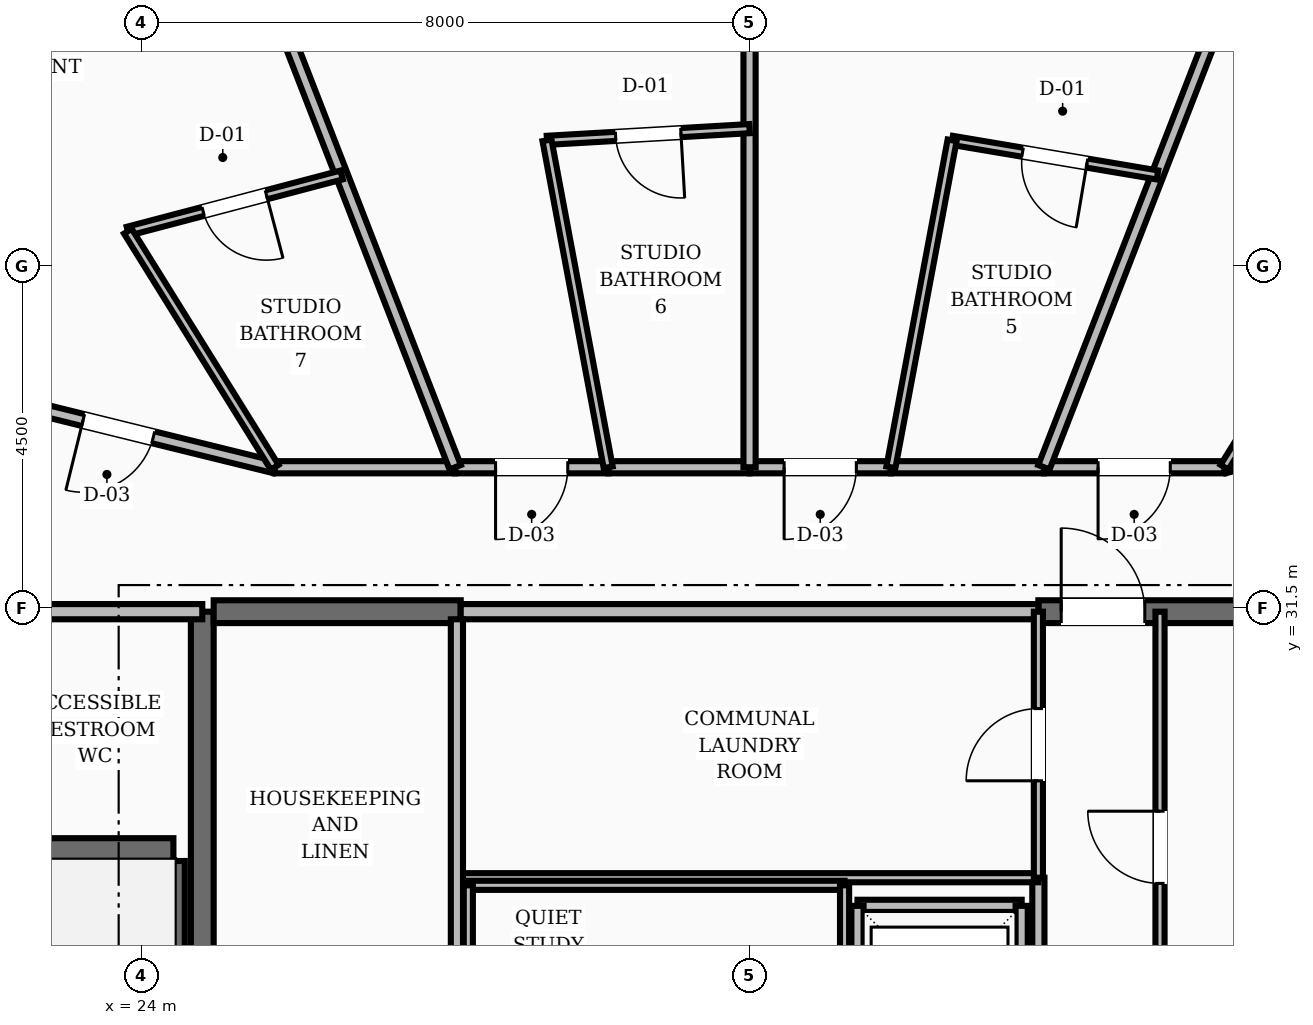
"""IFC4 building model, lengths in metres.
Left out: names, types, materials, properties, quantities, classifications, styles, units other than length and angle.
Written with IfcOpenShell. Run it as: python <this file> out.ifc"""

import sys

from ifc_helpers import new_model, si_unit, direction, frame, frame_2d, origin, place, context, subcontext, project, spatial, rectangle, extrude, element, fill, save


model = new_model("IFC4")
c1 = context("Model", 3, precision=1e-05, world=origin(), true_north=direction((0.0, 1.0)))
c2 = subcontext(c1, "Body", "Model", "MODEL_VIEW")
j1 = project(units=[si_unit("LENGTHUNIT", "METRE"), si_unit("PLANEANGLEUNIT", "RADIAN")], contexts=[c1])
p1 = place(None, origin())
s1 = spatial("IfcSite", under=j1, at=p1, CompositionType="ELEMENT")
p2 = place(p1, origin())
s2 = spatial("IfcBuilding", under=s1, at=p2, CompositionType="ELEMENT")
p3 = place(p2, frame((0.0, 0.0, 258.0)))
s3 = spatial("IfcBuildingStorey", under=s2, at=p3, CompositionType="ELEMENT", Elevation=258.0)
p4 = place(p3, frame((24.8, 25.15, 0.0), z_axis=(0.0, 0.0, 1.0), x_axis=(0.0, 1.0, 0.0)))
e1 = element("IfcWall", 1, at=p4, inside=s3, PredefinedType="SHEAR", context=c2, shape_type="SweptSolid", body=[
    extrude(rectangle(XDim=6.3, YDim=0.3, at=frame_2d((3.15, 0.0))), origin(), (0.0, 0.0, 1.0), 3.6),
])
p5 = place(p3, frame((24.95, 31.45, 0.0), z_axis=(0.0, 0.0, 1.0), x_axis=(1.0, 0.0, 0.0)))
e2 = element("IfcWall", 2, at=p5, inside=s3, PredefinedType="SHEAR", context=c2, shape_type="SweptSolid", body=[
    extrude(rectangle(XDim=3.25, YDim=0.3, at=frame_2d((1.625, 0.0))), origin(), (0.0, 0.0, 1.0), 3.6),
])
p6 = place(p3, frame((35.8, 31.45, 0.0), z_axis=(0.0, 0.0, 1.0), x_axis=(1.0, 0.0, 0.0)))
e3 = element("IfcWall", 3, at=p6, inside=s3, PredefinedType="SHEAR", context=c2, shape_type="SweptSolid", body=[
    extrude(rectangle(XDim=3.25, YDim=0.3, at=frame_2d((1.625, 0.0))), origin(), (0.0, 0.0, 1.0), 3.6),
])
p7 = place(p6, frame((0.3, 0.0, 0.0)))
e4 = element("IfcOpeningElement", 4, at=p7, cuts=e3, PredefinedType="OPENING", context=c2, shape_type="SweptSolid", body=[
    extrude(rectangle(XDim=1.1, YDim=2.1, at=frame_2d((0.55, 1.05))), frame((0.0, 0.16, 0.0), z_axis=(0.0, -1.0, 0.0), x_axis=(1.0, 0.0, 0.0)), (0.0, 0.0, 1.0), 0.32),
])
p8 = place(p3, frame((24.42, 19.43, 0.0), z_axis=(0.0, 0.0, 1.0), x_axis=(0.0, 1.0, 0.0)))
e5 = element("IfcWall", 5, at=p8, inside=s3, PredefinedType="SHEAR", context=c2, shape_type="SweptSolid", body=[
    extrude(rectangle(XDim=8.74, YDim=0.3, at=frame_2d((4.37, 0.0))), origin(), (0.0, 0.0, 1.0), 3.6),
])
p9 = place(p3, frame((20.82, 28.32, 0.0), z_axis=(0.0, 0.0, 1.0), x_axis=(1.0, 0.0, 0.0)))
e6 = element("IfcWall", 6, at=p9, inside=s3, PredefinedType="SHEAR", context=c2, shape_type="SweptSolid", body=[
    extrude(rectangle(XDim=3.6, YDim=0.3, at=frame_2d((1.8, 0.0))), origin(), (0.0, 0.0, 1.0), 3.6),
])
p10 = place(p3, frame((20.82, 31.45, 0.0), z_axis=(0.0, 0.0, 1.0), x_axis=(1.0, 0.0, 0.0)))
e7 = element("IfcWall", 7, at=p10, inside=s3, PredefinedType="SOLIDWALL", context=c2, shape_type="SweptSolid", body=[
    extrude(rectangle(XDim=3.98, YDim=0.2, at=frame_2d((1.99, 0.0))), origin(), (0.0, 0.0, 1.0), 2.87),
])
p11 = place(p3, frame((35.8, 25.25, 0.0), z_axis=(0.0, 0.0, 1.0), x_axis=(0.0, 1.0, 0.0)))
e8 = element("IfcWall", 8, at=p11, inside=s3, PredefinedType="SOLIDWALL", context=c2, shape_type="SweptSolid", body=[
    extrude(rectangle(XDim=2.7, YDim=0.16, at=frame_2d((1.35, 0.0))), origin(), (0.0, 0.0, 1.0), 2.87),
])
for number, where, z_axis, x_axis in (
    (9, (33.42, 27.58, 0.0), (0.0, 0.0, 1.0), (1.0, 0.0, 0.0)),
    (10, (33.42, 25.42, 0.0), (0.0, 0.0, 1.0), (0.0, 1.0, 0.0)),
    (11, (35.58, 25.42, 0.0), (0.0, 0.0, 1.0), (0.0, 1.0, 0.0)),
):
    element("IfcWall", number, at=place(p3, frame(where, z_axis=z_axis, x_axis=x_axis)), inside=s3, PredefinedType="SOLIDWALL", context=c2, shape_type="SweptSolid", body=[
        extrude(rectangle(XDim=2.16, YDim=0.16, at=frame_2d((1.08, 0.0))), origin(), (0.0, 0.0, 1.0), 2.87),
    ])
p12 = place(p3, frame((28.2, 31.45, 0.0), z_axis=(0.0, 0.0, 1.0), x_axis=(1.0, 0.0, 0.0)))
e12 = element("IfcWall", 12, at=p12, inside=s3, PredefinedType="SOLIDWALL", context=c2, shape_type="SweptSolid", body=[
    extrude(rectangle(XDim=7.6, YDim=0.2, at=frame_2d((3.8, 0.0))), origin(), (0.0, 0.0, 1.0), 2.87),
])
p13 = place(p3, frame((28.2, 27.95, 0.0), z_axis=(0.0, 0.0, 1.0), x_axis=(1.0, 0.0, 0.0)))
e13 = element("IfcWall", 13, at=p13, inside=s3, PredefinedType="PARTITIONING", context=c2, shape_type="SweptSolid", body=[
    extrude(rectangle(XDim=7.6, YDim=0.12, at=frame_2d((3.8, 0.0))), origin(), (0.0, 0.0, 1.0), 2.87),
])
p14 = place(p3, frame((35.8, 27.95, 0.0), z_axis=(0.0, 0.0, 1.0), x_axis=(0.0, 1.0, 0.0)))
e14 = element("IfcWall", 14, at=p14, inside=s3, PredefinedType="PARTITIONING", context=c2, shape_type="SweptSolid", body=[
    extrude(rectangle(XDim=3.5, YDim=0.12, at=frame_2d((1.75, 0.0))), origin(), (0.0, 0.0, 1.0), 2.87),
])
p15 = place(p14, frame((1.275, 0.0, 0.0)))
e15 = element("IfcOpeningElement", 15, at=p15, cuts=e14, PredefinedType="OPENING", context=c2, shape_type="SweptSolid", body=[
    extrude(rectangle(XDim=0.95, YDim=2.1, at=frame_2d((0.475, 1.05))), frame((0.0, 0.07, 0.0), z_axis=(0.0, -1.0, 0.0), x_axis=(1.0, 0.0, 0.0)), (0.0, 0.0, 1.0), 0.14),
])
p16 = place(p3, frame((28.3, 27.85, 0.0), z_axis=(0.0, 0.0, 1.0), x_axis=(1.0, 0.0, 0.0)))
e16 = element("IfcWall", 16, at=p16, inside=s3, PredefinedType="PARTITIONING", context=c2, shape_type="SweptSolid", body=[
    extrude(rectangle(XDim=4.95, YDim=0.12, at=frame_2d((2.475, 0.0))), origin(), (0.0, 0.0, 1.0), 2.87),
])
for number, where, z_axis, x_axis in (
    (17, (28.3, 25.35, 0.0), (0.0, 0.0, 1.0), (0.0, 1.0, 0.0)),
    (18, (33.25, 25.35, 0.0), (0.0, 0.0, 1.0), (0.0, 1.0, 0.0)),
):
    element("IfcWall", number, at=place(p3, frame(where, z_axis=z_axis, x_axis=x_axis)), inside=s3, PredefinedType="PARTITIONING", context=c2, shape_type="SweptSolid", body=[
        extrude(rectangle(XDim=2.5, YDim=0.12, at=frame_2d((1.25, 0.0))), origin(), (0.0, 0.0, 1.0), 2.87),
    ])
p17 = place(p3, frame((28.15, 25.25, 0.0), z_axis=(0.0, 0.0, 1.0), x_axis=(0.0, 1.0, 0.0)))
e19 = element("IfcWall", 19, at=p17, inside=s3, PredefinedType="SOLIDWALL", context=c2, shape_type="SweptSolid", body=[
    extrude(rectangle(XDim=6.1, YDim=0.16, at=frame_2d((3.05, 0.0))), origin(), (0.0, 0.0, 1.0), 2.87),
])
p18 = place(p3, frame((37.4, 25.25, 0.0), z_axis=(0.0, 0.0, 1.0), x_axis=(0.0, 1.0, 0.0)))
e20 = element("IfcWall", 20, at=p18, inside=s3, PredefinedType="PARTITIONING", context=c2, shape_type="SweptSolid", body=[
    extrude(rectangle(XDim=6.2, YDim=0.12, at=frame_2d((3.1, 0.0))), origin(), (0.0, 0.0, 1.0), 2.87),
])
p19 = place(p18, frame((2.625, 0.0, 0.0)))
e21 = element("IfcOpeningElement", 21, at=p19, cuts=e20, PredefinedType="OPENING", context=c2, shape_type="SweptSolid", body=[
    extrude(rectangle(XDim=0.95, YDim=2.1, at=frame_2d((0.475, 1.05))), frame((0.0, 0.07, 0.0), z_axis=(0.0, -1.0, 0.0), x_axis=(1.0, 0.0, 0.0)), (0.0, 0.0, 1.0), 0.14),
])
p20 = place(p3, frame((42.365, 34.365, 0.0), z_axis=(0.0, 0.0, 1.0), x_axis=(-0.970939799552, -0.239323850978, 0.0)))
e22 = element("IfcWall", 22, at=p20, inside=s3, PredefinedType="SOLIDWALL", context=c2, shape_type="SweptSolid", body=[
    extrude(rectangle(XDim=4.241, YDim=0.16, at=frame_2d((2.12, 0.0))), origin(), (0.0, 0.0, 1.0), 2.87),
])
p21 = place(p3, frame((38.248, 33.35, 0.0), z_axis=(0.0, 0.0, 1.0), x_axis=(-1.0, 0.0, 0.0)))
e23 = element("IfcWall", 23, at=p21, inside=s3, PredefinedType="SOLIDWALL", context=c2, shape_type="SweptSolid", body=[
    extrude(rectangle(XDim=2.375, YDim=0.16, at=frame_2d((1.188, 0.0))), origin(), (0.0, 0.0, 1.0), 2.87),
])
p22 = place(p21, frame((0.712, 0.0, 0.0)))
e24 = element("IfcOpeningElement", 24, at=p22, cuts=e23, PredefinedType="OPENING", context=c2, shape_type="SweptSolid", body=[
    extrude(rectangle(XDim=0.95, YDim=2.1, at=frame_2d((0.475, 1.05))), frame((0.0, 0.09, 0.0), z_axis=(0.0, -1.0, 0.0), x_axis=(1.0, 0.0, 0.0)), (0.0, 0.0, 1.0), 0.18),
])
p23 = place(p3, frame((35.873, 33.35, 0.0), z_axis=(0.0, 0.0, 1.0), x_axis=(-1.0, 0.0, 0.0)))
e25 = element("IfcWall", 25, at=p23, inside=s3, PredefinedType="SOLIDWALL", context=c2, shape_type="SweptSolid", body=[
    extrude(rectangle(XDim=2.013, YDim=0.16, at=frame_2d((1.006, 0.0))), origin(), (0.0, 0.0, 1.0), 2.87),
])
p24 = place(p3, frame((33.86, 33.35, 0.0), z_axis=(0.0, 0.0, 1.0), x_axis=(-1.0, 0.0, 0.0)))
e26 = element("IfcWall", 26, at=p24, inside=s3, PredefinedType="SOLIDWALL", context=c2, shape_type="SweptSolid", body=[
    extrude(rectangle(XDim=1.86, YDim=0.16, at=frame_2d((0.93, 0.0))), origin(), (0.0, 0.0, 1.0), 2.87),
])
p25 = place(p24, frame((0.455, 0.0, 0.0)))
e27 = element("IfcOpeningElement", 27, at=p25, cuts=e26, PredefinedType="OPENING", context=c2, shape_type="SweptSolid", body=[
    extrude(rectangle(XDim=0.95, YDim=2.1, at=frame_2d((0.475, 1.05))), frame((0.0, 0.09, 0.0), z_axis=(0.0, -1.0, 0.0), x_axis=(1.0, 0.0, 0.0)), (0.0, 0.0, 1.0), 0.18),
])
p26 = place(p3, frame((32.0, 33.35, 0.0), z_axis=(0.0, 0.0, 1.0), x_axis=(-1.0, 0.0, 0.0)))
e28 = element("IfcWall", 28, at=p26, inside=s3, PredefinedType="SOLIDWALL", context=c2, shape_type="SweptSolid", body=[
    extrude(rectangle(XDim=1.86, YDim=0.16, at=frame_2d((0.93, 0.0))), origin(), (0.0, 0.0, 1.0), 2.87),
])
p27 = place(p3, frame((30.14, 33.35, 0.0), z_axis=(0.0, 0.0, 1.0), x_axis=(-1.0, 0.0, 0.0)))
e29 = element("IfcWall", 29, at=p27, inside=s3, PredefinedType="SOLIDWALL", context=c2, shape_type="SweptSolid", body=[
    extrude(rectangle(XDim=2.013, YDim=0.16, at=frame_2d((1.006, 0.0))), origin(), (0.0, 0.0, 1.0), 2.87),
])
p28 = place(p27, frame((0.531, 0.0, 0.0)))
e30 = element("IfcOpeningElement", 30, at=p28, cuts=e29, PredefinedType="OPENING", context=c2, shape_type="SweptSolid", body=[
    extrude(rectangle(XDim=0.95, YDim=2.1, at=frame_2d((0.475, 1.05))), frame((0.0, 0.09, 0.0), z_axis=(0.0, -1.0, 0.0), x_axis=(1.0, 0.0, 0.0)), (0.0, 0.0, 1.0), 0.18),
])
p29 = place(p3, frame((28.127, 33.35, 0.0), z_axis=(0.0, 0.0, 1.0), x_axis=(-1.0, 0.0, 0.0)))
e31 = element("IfcWall", 31, at=p29, inside=s3, PredefinedType="SOLIDWALL", context=c2, shape_type="SweptSolid", body=[
    extrude(rectangle(XDim=2.375, YDim=0.16, at=frame_2d((1.188, 0.0))), origin(), (0.0, 0.0, 1.0), 2.87),
])
p30 = place(p3, frame((25.752, 33.35, 0.0), z_axis=(0.0, 0.0, 1.0), x_axis=(-0.970939799552, 0.239323850978, 0.0)))
e32 = element("IfcWall", 32, at=p30, inside=s3, PredefinedType="SOLIDWALL", context=c2, shape_type="SweptSolid", body=[
    extrude(rectangle(XDim=4.241, YDim=0.16, at=frame_2d((2.12, 0.0))), origin(), (0.0, 0.0, 1.0), 2.87),
])
p31 = place(p30, frame((1.646, 0.0, 0.0)))
e33 = element("IfcOpeningElement", 33, at=p31, cuts=e32, PredefinedType="OPENING", context=c2, shape_type="SweptSolid", body=[
    extrude(rectangle(XDim=0.95, YDim=2.1, at=frame_2d((0.475, 1.05))), frame((0.0, 0.09, 0.0), z_axis=(0.0, -1.0, 0.0), x_axis=(1.0, 0.0, 0.0)), (0.0, 0.0, 1.0), 0.18),
])
p32 = place(p3, frame((38.248, 33.35, 0.0), z_axis=(0.0, 0.0, 1.0), x_axis=(0.528107212433, 0.849177703532, 0.0)))
e34 = element("IfcWall", 34, at=p32, inside=s3, PredefinedType="PARTITIONING", context=c2, shape_type="SweptSolid", body=[
    extrude(rectangle(XDim=3.657, YDim=0.12, at=frame_2d((1.828, 0.0))), origin(), (0.0, 0.0, 1.0), 2.87),
])
p33 = place(p3, frame((35.873, 33.35, 0.0), z_axis=(0.0, 0.0, 1.0), x_axis=(0.362124603768, 0.932129696634, 0.0)))
e35 = element("IfcWall", 35, at=p33, inside=s3, PredefinedType="SOLIDWALL", context=c2, shape_type="SweptSolid", body=[
    extrude(rectangle(XDim=10.806, YDim=0.16, at=frame_2d((5.403, 0.0))), origin(), (0.0, 0.0, 1.0), 2.87),
])
p34 = place(p3, frame((37.367, 37.195, 0.0), z_axis=(0.0, 0.0, 1.0), x_axis=(-0.986081513145, 0.166262591807, 0.0)))
e36 = element("IfcWall", 36, at=p34, inside=s3, PredefinedType="PARTITIONING", context=c2, shape_type="SweptSolid", body=[
    extrude(rectangle(XDim=2.74, YDim=0.12, at=frame_2d((1.37, 0.0))), origin(), (0.0, 0.0, 1.0), 2.87),
])
p35 = place(p34, frame((0.94, 0.0, 0.0)))
e37 = element("IfcOpeningElement", 37, at=p35, cuts=e36, PredefinedType="OPENING", context=c2, shape_type="SweptSolid", body=[
    extrude(rectangle(XDim=0.86, YDim=2.1, at=frame_2d((0.43, 1.05))), frame((0.0, 0.07, 0.0), z_axis=(0.0, -1.0, 0.0), x_axis=(1.0, 0.0, 0.0)), (0.0, 0.0, 1.0), 0.14),
])
p36 = place(p3, frame((33.86, 33.35, 0.0), z_axis=(0.0, 0.0, 1.0), x_axis=(0.183965108809, 0.982932774273, 0.0)))
e38 = element("IfcWall", 38, at=p36, inside=s3, PredefinedType="PARTITIONING", context=c2, shape_type="SweptSolid", body=[
    extrude(rectangle(XDim=4.375, YDim=0.12, at=frame_2d((2.188, 0.0))), origin(), (0.0, 0.0, 1.0), 2.87),
])
p37 = place(p3, frame((32.0, 33.35, 0.0), z_axis=(0.0, 0.0, 1.0), x_axis=(0.0, 1.0, 0.0)))
e39 = element("IfcWall", 39, at=p37, inside=s3, PredefinedType="SOLIDWALL", context=c2, shape_type="SweptSolid", body=[
    extrude(rectangle(XDim=11.673, YDim=0.16, at=frame_2d((5.836, 0.0))), origin(), (0.0, 0.0, 1.0), 2.87),
])
p38 = place(p3, frame((32.0, 37.805, 0.0), z_axis=(0.0, 0.0, 1.0), x_axis=(-0.998333158382, -0.057713992024, 0.0)))
e40 = element("IfcWall", 40, at=p38, inside=s3, PredefinedType="PARTITIONING", context=c2, shape_type="SweptSolid", body=[
    extrude(rectangle(XDim=2.669, YDim=0.12, at=frame_2d((1.334, 0.0))), origin(), (0.0, 0.0, 1.0), 2.87),
])
p39 = place(p38, frame((0.905, 0.0, 0.0)))
e41 = element("IfcOpeningElement", 41, at=p39, cuts=e40, PredefinedType="OPENING", context=c2, shape_type="SweptSolid", body=[
    extrude(rectangle(XDim=0.86, YDim=2.1, at=frame_2d((0.43, 1.05))), frame((0.0, 0.07, 0.0), z_axis=(0.0, -1.0, 0.0), x_axis=(1.0, 0.0, 0.0)), (0.0, 0.0, 1.0), 0.14),
])
p40 = place(p3, frame((30.14, 33.35, 0.0), z_axis=(0.0, 0.0, 1.0), x_axis=(-0.183965108809, 0.982932774273, 0.0)))
e42 = element("IfcWall", 42, at=p40, inside=s3, PredefinedType="PARTITIONING", context=c2, shape_type="SweptSolid", body=[
    extrude(rectangle(XDim=4.375, YDim=0.12, at=frame_2d((2.188, 0.0))), origin(), (0.0, 0.0, 1.0), 2.87),
])
p41 = place(p3, frame((28.127, 33.35, 0.0), z_axis=(0.0, 0.0, 1.0), x_axis=(-0.362124603768, 0.932129696634, 0.0)))
e43 = element("IfcWall", 43, at=p41, inside=s3, PredefinedType="SOLIDWALL", context=c2, shape_type="SweptSolid", body=[
    extrude(rectangle(XDim=10.806, YDim=0.16, at=frame_2d((5.403, 0.0))), origin(), (0.0, 0.0, 1.0), 2.87),
])
p42 = place(p3, frame((26.633, 37.195, 0.0), z_axis=(0.0, 0.0, 1.0), x_axis=(-0.967075624846, -0.254489166427, 0.0)))
e44 = element("IfcWall", 44, at=p42, inside=s3, PredefinedType="PARTITIONING", context=c2, shape_type="SweptSolid", body=[
    extrude(rectangle(XDim=2.908, YDim=0.12, at=frame_2d((1.454, 0.0))), origin(), (0.0, 0.0, 1.0), 2.87),
])
p43 = place(p42, frame((1.024, 0.0, 0.0)))
e45 = element("IfcOpeningElement", 45, at=p43, cuts=e44, PredefinedType="OPENING", context=c2, shape_type="SweptSolid", body=[
    extrude(rectangle(XDim=0.86, YDim=2.1, at=frame_2d((0.43, 1.05))), frame((0.0, 0.07, 0.0), z_axis=(0.0, -1.0, 0.0), x_axis=(1.0, 0.0, 0.0)), (0.0, 0.0, 1.0), 0.14),
])
p44 = place(p3, frame((25.752, 33.35, 0.0), z_axis=(0.0, 0.0, 1.0), x_axis=(-0.528107212433, 0.849177703532, 0.0)))
e46 = element("IfcWall", 46, at=p44, inside=s3, PredefinedType="PARTITIONING", context=c2, shape_type="SweptSolid", body=[
    extrude(rectangle(XDim=3.657, YDim=0.12, at=frame_2d((1.828, 0.0))), origin(), (0.0, 0.0, 1.0), 2.87),
])
p45 = place(p7, origin())
e47 = element("IfcDoor", 47, at=p45, inside=s3, OperationType="SINGLE_SWING_LEFT", PredefinedType="DOOR", context=c2, shape_type="SweptSolid", body=[
    extrude(rectangle(XDim=1.1, YDim=2.1, at=frame_2d((0.55, 1.05))), frame((0.0, 0.025, 0.0), z_axis=(0.0, -1.0, 0.0), x_axis=(1.0, 0.0, 0.0)), (0.0, 0.0, 1.0), 0.05),
])
fill(e4, e47)
p46 = place(p15, origin())
e48 = element("IfcDoor", 48, at=p46, inside=s3, OperationType="SINGLE_SWING_LEFT", PredefinedType="DOOR", context=c2, shape_type="SweptSolid", body=[
    extrude(rectangle(XDim=0.95, YDim=2.1, at=frame_2d((0.475, 1.05))), frame((0.0, 0.025, 0.0), z_axis=(0.0, -1.0, 0.0), x_axis=(1.0, 0.0, 0.0)), (0.0, 0.0, 1.0), 0.05),
])
fill(e15, e48)
p47 = place(p19, origin())
e49 = element("IfcDoor", 49, at=p47, inside=s3, OperationType="SINGLE_SWING_RIGHT", PredefinedType="DOOR", context=c2, shape_type="SweptSolid", body=[
    extrude(rectangle(XDim=0.95, YDim=2.1, at=frame_2d((0.475, 1.05))), frame((0.0, 0.025, 0.0), z_axis=(0.0, -1.0, 0.0), x_axis=(1.0, 0.0, 0.0)), (0.0, 0.0, 1.0), 0.05),
])
fill(e21, e49)
p48 = place(p22, origin())
e50 = element("IfcDoor", 50, at=p48, inside=s3, OperationType="SINGLE_SWING_RIGHT", PredefinedType="DOOR", context=c2, shape_type="SweptSolid", body=[
    extrude(rectangle(XDim=0.95, YDim=2.1, at=frame_2d((0.475, 1.05))), frame((0.0, 0.025, 0.0), z_axis=(0.0, -1.0, 0.0), x_axis=(1.0, 0.0, 0.0)), (0.0, 0.0, 1.0), 0.05),
])
fill(e24, e50)
p49 = place(p35, origin())
e51 = element("IfcDoor", 51, at=p49, inside=s3, OperationType="SINGLE_SWING_LEFT", PredefinedType="DOOR", context=c2, shape_type="SweptSolid", body=[
    extrude(rectangle(XDim=0.86, YDim=2.1, at=frame_2d((0.43, 1.05))), frame((0.0, 0.025, 0.0), z_axis=(0.0, -1.0, 0.0), x_axis=(1.0, 0.0, 0.0)), (0.0, 0.0, 1.0), 0.05),
])
fill(e37, e51)
p50 = place(p25, origin())
e52 = element("IfcDoor", 52, at=p50, inside=s3, OperationType="SINGLE_SWING_RIGHT", PredefinedType="DOOR", context=c2, shape_type="SweptSolid", body=[
    extrude(rectangle(XDim=0.95, YDim=2.1, at=frame_2d((0.475, 1.05))), frame((0.0, 0.025, 0.0), z_axis=(0.0, -1.0, 0.0), x_axis=(1.0, 0.0, 0.0)), (0.0, 0.0, 1.0), 0.05),
])
fill(e27, e52)
p51 = place(p39, origin())
e53 = element("IfcDoor", 53, at=p51, inside=s3, OperationType="SINGLE_SWING_LEFT", PredefinedType="DOOR", context=c2, shape_type="SweptSolid", body=[
    extrude(rectangle(XDim=0.86, YDim=2.1, at=frame_2d((0.43, 1.05))), frame((0.0, 0.025, 0.0), z_axis=(0.0, -1.0, 0.0), x_axis=(1.0, 0.0, 0.0)), (0.0, 0.0, 1.0), 0.05),
])
fill(e41, e53)
p52 = place(p28, origin())
e54 = element("IfcDoor", 54, at=p52, inside=s3, OperationType="SINGLE_SWING_RIGHT", PredefinedType="DOOR", context=c2, shape_type="SweptSolid", body=[
    extrude(rectangle(XDim=0.95, YDim=2.1, at=frame_2d((0.475, 1.05))), frame((0.0, 0.025, 0.0), z_axis=(0.0, -1.0, 0.0), x_axis=(1.0, 0.0, 0.0)), (0.0, 0.0, 1.0), 0.05),
])
fill(e30, e54)
p53 = place(p43, origin())
e55 = element("IfcDoor", 55, at=p53, inside=s3, OperationType="SINGLE_SWING_LEFT", PredefinedType="DOOR", context=c2, shape_type="SweptSolid", body=[
    extrude(rectangle(XDim=0.86, YDim=2.1, at=frame_2d((0.43, 1.05))), frame((0.0, 0.025, 0.0), z_axis=(0.0, -1.0, 0.0), x_axis=(1.0, 0.0, 0.0)), (0.0, 0.0, 1.0), 0.05),
])
fill(e45, e55)
p54 = place(p31, origin())
e56 = element("IfcDoor", 56, at=p54, inside=s3, OperationType="SINGLE_SWING_RIGHT", PredefinedType="DOOR", context=c2, shape_type="SweptSolid", body=[
    extrude(rectangle(XDim=0.95, YDim=2.1, at=frame_2d((0.475, 1.05))), frame((0.0, 0.025, 0.0), z_axis=(0.0, -1.0, 0.0), x_axis=(1.0, 0.0, 0.0)), (0.0, 0.0, 1.0), 0.05),
])
fill(e33, e56)
save(model, sys.argv[1])
